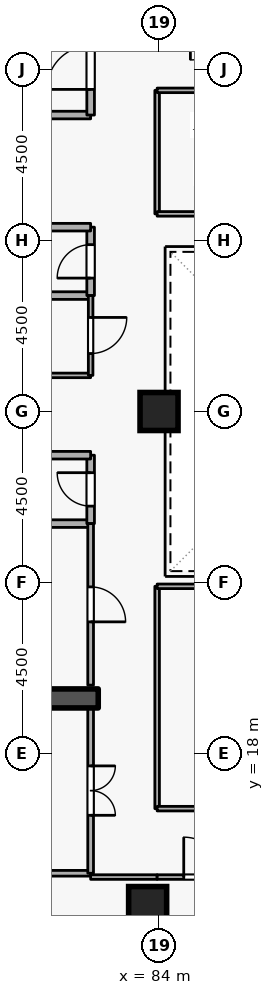
"""IFC4 building model, lengths in metres.
Left out: names, types, materials, properties, quantities, classifications, styles, units other than length and angle.
Written with IfcOpenShell. Run it as: python <this file> out.ifc"""

import sys

from ifc_helpers import new_model, si_unit, direction, frame, frame_2d, origin, origin_2d, place, context, subcontext, project, spatial, rectangle, extrude, element, fill, save


model = new_model("IFC4")
c1 = context("Model", 3, precision=1e-05, world=origin(), true_north=direction((0.0, 1.0)))
c2 = subcontext(c1, "Body", "Model", "MODEL_VIEW")
j1 = project(units=[si_unit("LENGTHUNIT", "METRE"), si_unit("PLANEANGLEUNIT", "RADIAN")], contexts=[c1])
p1 = place(None, origin())
s1 = spatial("IfcSite", under=j1, at=p1, CompositionType="ELEMENT")
p2 = place(p1, origin())
s2 = spatial("IfcBuilding", under=s1, at=p2, CompositionType="ELEMENT")
p3 = place(p2, frame((0.0, 0.0, 207.3)))
s3 = spatial("IfcBuildingStorey", under=s2, at=p3, CompositionType="ELEMENT", Elevation=207.3)
p4 = place(p3, frame((76.6, 19.45, 0.0), z_axis=(0.0, 0.0, 1.0), x_axis=(1.0, 0.0, 0.0)))
e1 = element("IfcWall", 1, at=p4, inside=s3, PredefinedType="SHEAR", context=c2, shape_type="SweptSolid", body=[
    extrude(rectangle(XDim=5.8, YDim=0.5, at=frame_2d((2.9, 0.0))), origin(), (0.0, 0.0, 1.0), 3.6),
])
for number, where, z_axis, x_axis in (
    (2, (83.7, 14.0, 0.0), (0.0, 0.0, 1.0), (1.0, 0.0, 0.0)),
    (3, (84.0, 27.0, 0.0), (0.0, 0.0, 1.0), (1.0, 0.0, 0.0)),
):
    element("IfcColumn", number, at=place(p3, frame(where, z_axis=z_axis, x_axis=x_axis)), inside=s3, PredefinedType="COLUMN", context=c2, shape_type="SweptSolid", body=[
        extrude(rectangle(XDim=1.0, YDim=1.0, at=origin_2d()), origin(), (0.0, 0.0, 1.0), 3.6),
    ])
p5 = place(p3, frame((79.9, 34.8, 0.0), z_axis=(0.0, 0.0, 1.0), x_axis=(1.0, 0.0, 0.0)))
e4 = element("IfcWall", 4, at=p5, inside=s3, PredefinedType="STANDARD", context=c2, shape_type="SweptSolid", body=[
    extrude(rectangle(XDim=2.3, YDim=0.2, at=frame_2d((1.15, 0.0))), origin(), (0.0, 0.0, 1.0), 2.545),
])
p6 = place(p3, frame((82.2, 34.8, 0.0), z_axis=(0.0, 0.0, 1.0), x_axis=(0.0, 1.0, 0.0)))
e5 = element("IfcWall", 5, at=p6, inside=s3, PredefinedType="STANDARD", context=c2, shape_type="SweptSolid", body=[
    extrude(rectangle(XDim=2.5, YDim=0.2, at=frame_2d((1.25, 0.0))), origin(), (0.0, 0.0, 1.0), 3.34),
])
p7 = place(p6, frame((0.675, 0.0, 0.0)))
e6 = element("IfcOpeningElement", 6, at=p7, cuts=e5, PredefinedType="OPENING", context=c2, shape_type="SweptSolid", body=[
    extrude(rectangle(XDim=1.15, YDim=2.1, at=frame_2d((0.575, 1.05))), frame((0.0, 0.11, 0.0), z_axis=(0.0, -1.0, 0.0), x_axis=(1.0, 0.0, 0.0)), (0.0, 0.0, 1.0), 0.22),
])
p8 = place(p3, frame((80.15, 24.05, 0.0), z_axis=(0.0, 0.0, 1.0), x_axis=(1.0, 0.0, 0.0)))
e7 = element("IfcWall", 7, at=p8, inside=s3, PredefinedType="STANDARD", context=c2, shape_type="SweptSolid", body=[
    extrude(rectangle(XDim=2.05, YDim=0.2, at=frame_2d((1.025, 0.0))), origin(), (0.0, 0.0, 1.0), 3.34),
])
p9 = place(p3, frame((82.2, 24.05, 0.0), z_axis=(0.0, 0.0, 1.0), x_axis=(0.0, 1.0, 0.0)))
e8 = element("IfcWall", 8, at=p9, inside=s3, PredefinedType="STANDARD", context=c2, shape_type="SweptSolid", body=[
    extrude(rectangle(XDim=1.8, YDim=0.2, at=frame_2d((0.9, 0.0))), origin(), (0.0, 0.0, 1.0), 3.34),
])
p10 = place(p9, frame((0.46, 0.0, 0.0)))
e9 = element("IfcOpeningElement", 9, at=p10, cuts=e8, PredefinedType="OPENING", context=c2, shape_type="SweptSolid", body=[
    extrude(rectangle(XDim=0.88, YDim=2.04, at=frame_2d((0.44, 1.02))), frame((0.0, 0.11, 0.0), z_axis=(0.0, -1.0, 0.0), x_axis=(1.0, 0.0, 0.0)), (0.0, 0.0, 1.0), 0.22),
])
for number, where, z_axis, x_axis in (
    (10, (82.2, 25.85, 0.0), (0.0, 0.0, 1.0), (-1.0, 0.0, 0.0)),
    (11, (80.15, 30.05, 0.0), (0.0, 0.0, 1.0), (1.0, 0.0, 0.0)),
):
    element("IfcWall", number, at=place(p3, frame(where, z_axis=z_axis, x_axis=x_axis)), inside=s3, PredefinedType="STANDARD", context=c2, shape_type="SweptSolid", body=[
        extrude(rectangle(XDim=2.05, YDim=0.2, at=frame_2d((1.025, 0.0))), origin(), (0.0, 0.0, 1.0), 3.34),
    ])
p11 = place(p3, frame((82.2, 30.05, 0.0), z_axis=(0.0, 0.0, 1.0), x_axis=(0.0, 1.0, 0.0)))
e12 = element("IfcWall", 12, at=p11, inside=s3, PredefinedType="STANDARD", context=c2, shape_type="SweptSolid", body=[
    extrude(rectangle(XDim=1.8, YDim=0.2, at=frame_2d((0.9, 0.0))), origin(), (0.0, 0.0, 1.0), 3.34),
])
p12 = place(p11, frame((0.46, 0.0, 0.0)))
e13 = element("IfcOpeningElement", 13, at=p12, cuts=e12, PredefinedType="OPENING", context=c2, shape_type="SweptSolid", body=[
    extrude(rectangle(XDim=0.88, YDim=2.04, at=frame_2d((0.44, 1.02))), frame((0.0, 0.11, 0.0), z_axis=(0.0, -1.0, 0.0), x_axis=(1.0, 0.0, 0.0)), (0.0, 0.0, 1.0), 0.22),
])
p13 = place(p3, frame((82.2, 31.85, 0.0), z_axis=(0.0, 0.0, 1.0), x_axis=(-1.0, 0.0, 0.0)))
e14 = element("IfcWall", 14, at=p13, inside=s3, PredefinedType="STANDARD", context=c2, shape_type="SweptSolid", body=[
    extrude(rectangle(XDim=2.05, YDim=0.2, at=frame_2d((1.025, 0.0))), origin(), (0.0, 0.0, 1.0), 3.34),
])
p14 = place(p3, frame((82.2, 24.05, 0.0), z_axis=(0.0, 0.0, 1.0), x_axis=(0.0, -1.0, 0.0)))
e15 = element("IfcWall", 15, at=p14, inside=s3, PredefinedType="PARTITIONING", context=c2, shape_type="SweptSolid", body=[
    extrude(rectangle(XDim=4.25, YDim=0.15, at=frame_2d((2.125, 0.0))), origin(), (0.0, 0.0, 1.0), 3.34),
])
p15 = place(p14, frame((1.665, 0.0, 0.0)))
e16 = element("IfcOpeningElement", 16, at=p15, cuts=e15, PredefinedType="OPENING", context=c2, shape_type="SweptSolid", body=[
    extrude(rectangle(XDim=0.92, YDim=2.08, at=frame_2d((0.46, 1.04))), frame((0.0, 0.085, 0.0), z_axis=(0.0, -1.0, 0.0), x_axis=(1.0, 0.0, 0.0)), (0.0, 0.0, 1.0), 0.17),
])
p16 = place(p3, frame((82.2, 27.95, 0.0), z_axis=(0.0, 0.0, 1.0), x_axis=(-1.0, 0.0, 0.0)))
e17 = element("IfcWall", 17, at=p16, inside=s3, PredefinedType="PARTITIONING", context=c2, shape_type="SweptSolid", body=[
    extrude(rectangle(XDim=2.05, YDim=0.12, at=frame_2d((1.025, 0.0))), origin(), (0.0, 0.0, 1.0), 3.34),
])
p17 = place(p3, frame((82.2, 30.05, 0.0), z_axis=(0.0, 0.0, 1.0), x_axis=(0.0, -1.0, 0.0)))
e18 = element("IfcWall", 18, at=p17, inside=s3, PredefinedType="PARTITIONING", context=c2, shape_type="SweptSolid", body=[
    extrude(rectangle(XDim=2.1, YDim=0.12, at=frame_2d((1.05, 0.0))), origin(), (0.0, 0.0, 1.0), 3.34),
])
p18 = place(p17, frame((0.575, 0.0, 0.0)))
e19 = element("IfcOpeningElement", 19, at=p18, cuts=e18, PredefinedType="OPENING", context=c2, shape_type="SweptSolid", body=[
    extrude(rectangle(XDim=0.95, YDim=2.1, at=frame_2d((0.475, 1.05))), frame((0.0, 0.07, 0.0), z_axis=(0.0, -1.0, 0.0), x_axis=(1.0, 0.0, 0.0)), (0.0, 0.0, 1.0), 0.14),
])
p19 = place(p3, frame((82.2, 14.85, 0.0), z_axis=(0.0, 0.0, 1.0), x_axis=(-1.0, 0.0, 0.0)))
e20 = element("IfcWall", 20, at=p19, inside=s3, PredefinedType="PARTITIONING", context=c2, shape_type="SweptSolid", body=[
    extrude(rectangle(XDim=17.42, YDim=0.15, at=frame_2d((8.71, 0.0))), origin(), (0.0, 0.0, 1.0), 3.34),
])
p20 = place(p3, frame((82.2, 19.2, 0.0), z_axis=(0.0, 0.0, 1.0), x_axis=(0.0, -1.0, 0.0)))
e21 = element("IfcWall", 21, at=p20, inside=s3, PredefinedType="PARTITIONING", context=c2, shape_type="SweptSolid", body=[
    extrude(rectangle(XDim=4.35, YDim=0.15, at=frame_2d((2.175, 0.0))), origin(), (0.0, 0.0, 1.0), 3.34),
])
p21 = place(p20, frame((1.525, 0.0, 0.0)))
e22 = element("IfcOpeningElement", 22, at=p21, cuts=e21, PredefinedType="OPENING", context=c2, shape_type="SweptSolid", body=[
    extrude(rectangle(XDim=1.3, YDim=2.12, at=frame_2d((0.65, 1.06))), frame((0.0, 0.085, 0.0), z_axis=(0.0, -1.0, 0.0), x_axis=(1.0, 0.0, 0.0)), (0.0, 0.0, 1.0), 0.17),
])
p22 = place(p3, frame((82.2, 14.75, 0.0), z_axis=(0.0, 0.0, 1.0), x_axis=(1.0, 0.0, 0.0)))
e23 = element("IfcWall", 23, at=p22, inside=s3, PredefinedType="PARTITIONING", context=c2, shape_type="SweptSolid", body=[
    extrude(rectangle(XDim=1.75, YDim=0.12, at=frame_2d((0.875, 0.0))), origin(), (0.0, 0.0, 1.0), 3.34),
])
p23 = place(p3, frame((83.95, 14.75, 0.0), z_axis=(0.0, 0.0, 1.0), x_axis=(1.0, 0.0, 0.0)))
e24 = element("IfcWall", 24, at=p23, inside=s3, PredefinedType="PARTITIONING", context=c2, shape_type="SweptSolid", body=[
    extrude(rectangle(XDim=2.45, YDim=0.12, at=frame_2d((1.225, 0.0))), origin(), (0.0, 0.0, 1.0), 3.34),
])
p24 = place(p23, frame((0.7, 0.0, 0.0)))
e25 = element("IfcOpeningElement", 25, at=p24, cuts=e24, PredefinedType="OPENING", context=c2, shape_type="SweptSolid", body=[
    extrude(rectangle(XDim=1.05, YDim=2.1, at=frame_2d((0.525, 1.05))), frame((0.0, 0.07, 0.0), z_axis=(0.0, -1.0, 0.0), x_axis=(1.0, 0.0, 0.0)), (0.0, 0.0, 1.0), 0.14),
])
p25 = place(p3, frame((83.95, 16.55, 0.0), z_axis=(0.0, 0.0, 1.0), x_axis=(0.0, 1.0, 0.0)))
e26 = element("IfcWall", 26, at=p25, inside=s3, PredefinedType="PARTITIONING", context=c2, shape_type="SweptSolid", body=[
    extrude(rectangle(XDim=5.85, YDim=0.12, at=frame_2d((2.925, 0.0))), origin(), (0.0, 0.0, 1.0), 3.34),
])
p26 = place(p3, frame((83.95, 22.4, 0.0), z_axis=(0.0, 0.0, 1.0), x_axis=(1.0, 0.0, 0.0)))
e27 = element("IfcWall", 27, at=p26, inside=s3, PredefinedType="PARTITIONING", context=c2, shape_type="SweptSolid", body=[
    extrude(rectangle(XDim=9.1, YDim=0.12, at=frame_2d((4.55, 0.0))), origin(), (0.0, 0.0, 1.0), 3.34),
])
p27 = place(p3, frame((93.05, 16.55, 0.0), z_axis=(0.0, 0.0, 1.0), x_axis=(-1.0, 0.0, 0.0)))
e28 = element("IfcWall", 28, at=p27, inside=s3, PredefinedType="PARTITIONING", context=c2, shape_type="SweptSolid", body=[
    extrude(rectangle(XDim=9.1, YDim=0.12, at=frame_2d((4.55, 0.0))), origin(), (0.0, 0.0, 1.0), 3.34),
])
p28 = place(p27, frame((4.075, 0.0, 0.0)))
e29 = element("IfcOpeningElement", 29, at=p28, cuts=e28, PredefinedType="OPENING", context=c2, shape_type="SweptSolid", body=[
    extrude(rectangle(XDim=0.95, YDim=2.1, at=frame_2d((0.475, 1.05))), frame((0.0, 0.07, 0.0), z_axis=(0.0, -1.0, 0.0), x_axis=(1.0, 0.0, 0.0)), (0.0, 0.0, 1.0), 0.14),
])
p29 = place(p3, frame((83.95, 32.2, 0.0), z_axis=(0.0, 0.0, 1.0), x_axis=(0.0, 1.0, 0.0)))
e30 = element("IfcWall", 30, at=p29, inside=s3, PredefinedType="PARTITIONING", context=c2, shape_type="SweptSolid", body=[
    extrude(rectangle(XDim=3.25, YDim=0.12, at=frame_2d((1.625, 0.0))), origin(), (0.0, 0.0, 1.0), 3.34),
])
p30 = place(p3, frame((83.95, 35.45, 0.0), z_axis=(0.0, 0.0, 1.0), x_axis=(1.0, 0.0, 0.0)))
e31 = element("IfcWall", 31, at=p30, inside=s3, PredefinedType="PARTITIONING", context=c2, shape_type="SweptSolid", body=[
    extrude(rectangle(XDim=9.1, YDim=0.12, at=frame_2d((4.55, 0.0))), origin(), (0.0, 0.0, 1.0), 3.34),
])
p31 = place(p30, frame((4.075, 0.0, 0.0)))
e32 = element("IfcOpeningElement", 32, at=p31, cuts=e31, PredefinedType="OPENING", context=c2, shape_type="SweptSolid", body=[
    extrude(rectangle(XDim=0.95, YDim=2.1, at=frame_2d((0.475, 1.05))), frame((0.0, 0.07, 0.0), z_axis=(0.0, -1.0, 0.0), x_axis=(1.0, 0.0, 0.0)), (0.0, 0.0, 1.0), 0.14),
])
p32 = place(p3, frame((93.05, 32.2, 0.0), z_axis=(0.0, 0.0, 1.0), x_axis=(-1.0, 0.0, 0.0)))
e33 = element("IfcWall", 33, at=p32, inside=s3, PredefinedType="PARTITIONING", context=c2, shape_type="SweptSolid", body=[
    extrude(rectangle(XDim=9.1, YDim=0.12, at=frame_2d((4.55, 0.0))), origin(), (0.0, 0.0, 1.0), 3.34),
])
p33 = place(p7, origin())
e34 = element("IfcDoor", 34, at=p33, inside=s3, OperationType="SINGLE_SWING_LEFT", PredefinedType="DOOR", context=c2, shape_type="SweptSolid", body=[
    extrude(rectangle(XDim=1.15, YDim=2.1, at=frame_2d((0.575, 1.05))), frame((0.0, 0.025, 0.0), z_axis=(0.0, -1.0, 0.0), x_axis=(1.0, 0.0, 0.0)), (0.0, 0.0, 1.0), 0.05),
])
fill(e6, e34)
p34 = place(p10, origin())
e35 = element("IfcDoor", 35, at=p34, inside=s3, OperationType="SINGLE_SWING_RIGHT", PredefinedType="DOOR", context=c2, shape_type="SweptSolid", body=[
    extrude(rectangle(XDim=0.88, YDim=2.04, at=frame_2d((0.44, 1.02))), frame((0.0, 0.025, 0.0), z_axis=(0.0, -1.0, 0.0), x_axis=(1.0, 0.0, 0.0)), (0.0, 0.0, 1.0), 0.05),
])
fill(e9, e35)
p35 = place(p12, origin())
e36 = element("IfcDoor", 36, at=p35, inside=s3, OperationType="SINGLE_SWING_LEFT", PredefinedType="DOOR", context=c2, shape_type="SweptSolid", body=[
    extrude(rectangle(XDim=0.88, YDim=2.04, at=frame_2d((0.44, 1.02))), frame((0.0, 0.025, 0.0), z_axis=(0.0, -1.0, 0.0), x_axis=(1.0, 0.0, 0.0)), (0.0, 0.0, 1.0), 0.05),
])
fill(e13, e36)
p36 = place(p15, origin())
e37 = element("IfcDoor", 37, at=p36, inside=s3, OperationType="SINGLE_SWING_RIGHT", PredefinedType="DOOR", context=c2, shape_type="SweptSolid", body=[
    extrude(rectangle(XDim=0.92, YDim=2.08, at=frame_2d((0.46, 1.04))), frame((0.0, 0.025, 0.0), z_axis=(0.0, -1.0, 0.0), x_axis=(1.0, 0.0, 0.0)), (0.0, 0.0, 1.0), 0.05),
])
fill(e16, e37)
p37 = place(p18, origin())
e38 = element("IfcDoor", 38, at=p37, inside=s3, OperationType="SINGLE_SWING_LEFT", PredefinedType="DOOR", context=c2, shape_type="SweptSolid", body=[
    extrude(rectangle(XDim=0.95, YDim=2.1, at=frame_2d((0.475, 1.05))), frame((0.0, 0.025, 0.0), z_axis=(0.0, -1.0, 0.0), x_axis=(1.0, 0.0, 0.0)), (0.0, 0.0, 1.0), 0.05),
])
fill(e19, e38)
p38 = place(p21, origin())
e39 = element("IfcDoor", 39, at=p38, inside=s3, OperationType="DOUBLE_DOOR_SINGLE_SWING", PredefinedType="DOOR", context=c2, shape_type="SweptSolid", body=[
    extrude(rectangle(XDim=1.3, YDim=2.12, at=frame_2d((0.65, 1.06))), frame((0.0, 0.025, 0.0), z_axis=(0.0, -1.0, 0.0), x_axis=(1.0, 0.0, 0.0)), (0.0, 0.0, 1.0), 0.05),
])
fill(e22, e39)
p39 = place(p24, origin())
e40 = element("IfcDoor", 40, at=p39, inside=s3, OperationType="SINGLE_SWING_LEFT", PredefinedType="DOOR", context=c2, shape_type="SweptSolid", body=[
    extrude(rectangle(XDim=1.05, YDim=2.1, at=frame_2d((0.525, 1.05))), frame((0.0, 0.025, 0.0), z_axis=(0.0, -1.0, 0.0), x_axis=(1.0, 0.0, 0.0)), (0.0, 0.0, 1.0), 0.05),
])
fill(e25, e40)
save(model, sys.argv[1])
